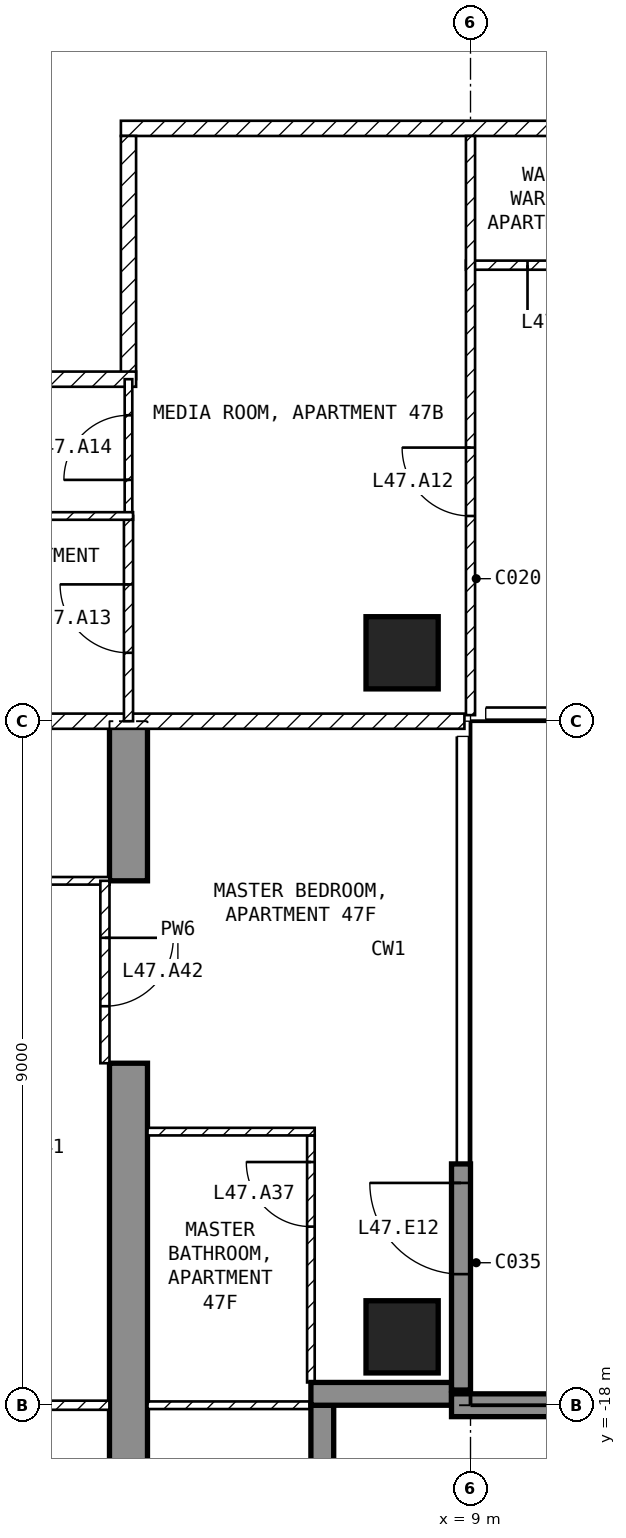
"""IFC4 building model, lengths in metres.
Left out: names, types, materials, properties, quantities, classifications, styles, units other than length and angle.
Written with IfcOpenShell. Run it as: python <this file> out.ifc"""

import sys

from ifc_helpers import new_model, si_unit, direction, frame, frame_2d, origin, origin_2d, place, context, subcontext, project, spatial, polyline, rectangle, outline, extrude, element, fill, save


model = new_model("IFC4")
c1 = context("Model", 3, precision=1e-05, world=origin(), true_north=direction((0.0, 1.0)))
c2 = subcontext(c1, "Body", "Model", "MODEL_VIEW")
j1 = project(units=[si_unit("LENGTHUNIT", "METRE"), si_unit("PLANEANGLEUNIT", "RADIAN")], contexts=[c1])
p1 = place(None, origin())
s1 = spatial("IfcSite", under=j1, at=p1, CompositionType="ELEMENT")
p2 = place(p1, origin())
s2 = spatial("IfcBuilding", under=s1, at=p2, CompositionType="ELEMENT")
p3 = place(p2, frame((0.0, 0.0, 191.1)))
s3 = spatial("IfcBuildingStorey", under=s2, at=p3, CompositionType="ELEMENT", Elevation=191.1)
for number, where, z_axis, x_axis in (
    (1, (8.1, -17.1, -0.25), (0.0, 0.0, 1.0), (1.0, 0.0, 0.0)),
    (2, (8.1, -8.1, -0.25), (0.0, 0.0, 1.0), (1.0, 0.0, 0.0)),
):
    element("IfcColumn", number, at=place(p3, frame(where, z_axis=z_axis, x_axis=x_axis)), inside=s3, PredefinedType="COLUMN", context=c2, shape_type="SweptSolid", body=[
        extrude(rectangle(XDim=0.95, YDim=0.95, at=origin_2d()), origin(), (0.0, 0.0, 1.0), 3.5),
    ])
p4 = place(p3, frame((4.25, -20.225, -0.25), z_axis=(1.0, 0.0, 0.0), x_axis=(0.0, 1.0, 0.0)))
e3 = element("IfcWall", 3, at=p4, inside=s3, PredefinedType="SHEAR", context=c2, shape_type="SweptSolid", body=[
    extrude(outline(polyline([(0.0, 0.0), (6.725, 0.0), (6.725, 2.65), (9.125, 2.65), (9.125, 0.0), (11.225, 0.0), (11.225, 3.5), (0.0, 3.5), (0.0, 0.0)])), origin(), (0.0, 0.0, 1.0), 0.5),
])
p5 = place(p3, frame((8.875, -17.8, 0.0), z_axis=(0.0, 0.0, 1.0), x_axis=(0.0, 1.0, 0.0)))
e4 = element("IfcWall", 4, at=p5, inside=s3, PredefinedType="SOLIDWALL", context=c2, shape_type="SweptSolid", body=[
    extrude(rectangle(XDim=2.975, YDim=0.25, at=frame_2d((1.488, 0.0))), origin(), (0.0, 0.0, 1.0), 3.25),
])
p6 = place(p5, frame((1.525, 0.0, 0.0)))
e5 = element("IfcOpeningElement", 5, at=p6, cuts=e4, PredefinedType="OPENING", context=c2, shape_type="SweptSolid", body=[
    extrude(rectangle(XDim=1.2, YDim=2.4, at=frame_2d((0.6, 1.2))), frame((0.0, 0.135, 0.0), z_axis=(0.0, -1.0, 0.0), x_axis=(1.0, 0.0, 0.0)), (0.0, 0.0, 1.0), 0.27),
])
p7 = place(p3, frame((7.05, -19.8, 0.0), z_axis=(0.0, 0.0, 1.0), x_axis=(0.0, 1.0, 0.0)))
e6 = element("IfcWall", 6, at=p7, inside=s3, PredefinedType="SOLIDWALL", context=c2, shape_type="SweptSolid", body=[
    extrude(rectangle(XDim=1.8, YDim=0.3, at=frame_2d((0.9, 0.0))), origin(), (0.0, 0.0, 1.0), 3.25),
])
p8 = place(p3, frame((6.9, -17.85, 0.0), z_axis=(0.0, 0.0, 1.0), x_axis=(1.0, 0.0, 0.0)))
e7 = element("IfcWall", 7, at=p8, inside=s3, PredefinedType="SOLIDWALL", context=c2, shape_type="SweptSolid", body=[
    extrude(rectangle(XDim=1.85, YDim=0.3, at=frame_2d((0.925, 0.0))), origin(), (0.0, 0.0, 1.0), 3.25),
])
p9 = place(p3, frame((8.75, -18.0, 0.0), z_axis=(0.0, 0.0, 1.0), x_axis=(1.0, 0.0, 0.0)))
e8 = element("IfcWall", 8, at=p9, inside=s3, PredefinedType="SOLIDWALL", context=c2, shape_type="SweptSolid", body=[
    extrude(rectangle(XDim=2.95, YDim=0.3, at=frame_2d((1.475, 0.0))), origin(), (0.0, 0.0, 1.0), 3.25),
])
p10 = place(p3, frame((21.6, -1.2, 0.0), z_axis=(0.0, 0.0, 1.0), x_axis=(-1.0, 0.0, 0.0)))
e9 = element("IfcWall", 9, at=p10, inside=s3, PredefinedType="PARTITIONING", context=c2, shape_type="SweptSolid", body=[
    extrude(rectangle(XDim=17.2, YDim=0.2, at=frame_2d((8.6, 0.0))), origin(), (0.0, 0.0, 1.0), 3.25),
])
p11 = place(p10, frame((6.1, 0.0, 0.0)))
e10 = element("IfcOpeningElement", 10, at=p11, cuts=e9, PredefinedType="OPENING", context=c2, shape_type="SweptSolid", body=[
    extrude(rectangle(XDim=1.0, YDim=2.1, at=frame_2d((0.5, 1.05))), frame((0.0, 0.11, 0.0), z_axis=(0.0, -1.0, 0.0), x_axis=(1.0, 0.0, 0.0)), (0.0, 0.0, 1.0), 0.22),
])
p12 = place(p3, frame((4.5, -1.3, 0.0), z_axis=(0.0, 0.0, 1.0), x_axis=(0.0, -1.0, 0.0)))
e11 = element("IfcWall", 11, at=p12, inside=s3, PredefinedType="PARTITIONING", context=c2, shape_type="SweptSolid", body=[
    extrude(rectangle(XDim=3.2, YDim=0.2, at=frame_2d((1.6, 0.0))), origin(), (0.0, 0.0, 1.0), 3.25),
])
p13 = place(p3, frame((4.6, -4.5, 0.0), z_axis=(0.0, 0.0, 1.0), x_axis=(-1.0, 0.0, 0.0)))
e12 = element("IfcWall", 12, at=p13, inside=s3, PredefinedType="PARTITIONING", context=c2, shape_type="SweptSolid", body=[
    extrude(rectangle(XDim=3.5, YDim=0.2, at=frame_2d((1.75, 0.0))), origin(), (0.0, 0.0, 1.0), 3.25),
])
p14 = place(p3, frame((8.92, -9.0, 0.0), z_axis=(0.0, 0.0, 1.0), x_axis=(-1.0, 0.0, 0.0)))
e13 = element("IfcWall", 13, at=p14, inside=s3, PredefinedType="PARTITIONING", context=c2, shape_type="SweptSolid", body=[
    extrude(rectangle(XDim=17.84, YDim=0.2, at=frame_2d((8.92, 0.0))), origin(), (0.0, 0.0, 1.0), 3.25),
])
p15 = place(p14, frame((8.42, 0.0, 0.0)))
e14 = element("IfcOpeningElement", 14, at=p15, cuts=e13, PredefinedType="OPENING", context=c2, shape_type="SweptSolid", body=[
    extrude(rectangle(XDim=1.0, YDim=2.1, at=frame_2d((0.5, 1.05))), frame((0.0, 0.11, 0.0), z_axis=(0.0, -1.0, 0.0), x_axis=(1.0, 0.0, 0.0)), (0.0, 0.0, 1.0), 0.22),
])
p16 = place(p3, frame((11.4, -3.0, 0.0), z_axis=(0.0, 0.0, 1.0), x_axis=(-1.0, 0.0, 0.0)))
e15 = element("IfcWall", 15, at=p16, inside=s3, PredefinedType="PARTITIONING", context=c2, shape_type="SweptSolid", body=[
    extrude(rectangle(XDim=2.46, YDim=0.12, at=frame_2d((1.23, 0.0))), origin(), (0.0, 0.0, 1.0), 3.25),
])
p17 = place(p16, frame((0.75, 0.0, 0.0)))
e16 = element("IfcOpeningElement", 16, at=p17, cuts=e15, PredefinedType="OPENING", context=c2, shape_type="SweptSolid", body=[
    extrude(rectangle(XDim=0.9, YDim=2.1, at=frame_2d((0.45, 1.05))), frame((0.0, 0.07, 0.0), z_axis=(0.0, -1.0, 0.0), x_axis=(1.0, 0.0, 0.0)), (0.0, 0.0, 1.0), 0.14),
])
p18 = place(p3, frame((9.0, -8.92, 0.0), z_axis=(0.0, 0.0, 1.0), x_axis=(0.0, 1.0, 0.0)))
e17 = element("IfcWall", 17, at=p18, inside=s3, PredefinedType="PARTITIONING", context=c2, shape_type="SweptSolid", body=[
    extrude(rectangle(XDim=7.62, YDim=0.12, at=frame_2d((3.81, 0.0))), origin(), (0.0, 0.0, 1.0), 3.25),
])
p19 = place(p18, frame((2.62, 0.0, 0.0)))
e18 = element("IfcOpeningElement", 18, at=p19, cuts=e17, PredefinedType="OPENING", context=c2, shape_type="SweptSolid", body=[
    extrude(rectangle(XDim=0.9, YDim=2.1, at=frame_2d((0.45, 1.05))), frame((0.0, 0.07, 0.0), z_axis=(0.0, -1.0, 0.0), x_axis=(1.0, 0.0, 0.0)), (0.0, 0.0, 1.0), 0.14),
])
p20 = place(p3, frame((4.5, -6.3, 0.0), z_axis=(0.0, 0.0, 1.0), x_axis=(0.0, 1.0, 0.0)))
e19 = element("IfcWall", 19, at=p20, inside=s3, PredefinedType="PARTITIONING", context=c2, shape_type="SweptSolid", body=[
    extrude(rectangle(XDim=1.8, YDim=0.1, at=frame_2d((0.9, 0.0))), origin(), (0.0, 0.0, 1.0), 3.25),
])
p21 = place(p20, frame((0.475, 0.0, 0.0)))
e20 = element("IfcOpeningElement", 20, at=p21, cuts=e19, PredefinedType="OPENING", context=c2, shape_type="SweptSolid", body=[
    extrude(rectangle(XDim=0.85, YDim=2.1, at=frame_2d((0.425, 1.05))), frame((0.0, 0.06, 0.0), z_axis=(0.0, -1.0, 0.0), x_axis=(1.0, 0.0, 0.0)), (0.0, 0.0, 1.0), 0.12),
])
p22 = place(p3, frame((4.5, -9.0, 0.0), z_axis=(0.0, 0.0, 1.0), x_axis=(0.0, 1.0, 0.0)))
e21 = element("IfcWall", 21, at=p22, inside=s3, PredefinedType="PARTITIONING", context=c2, shape_type="SweptSolid", body=[
    extrude(rectangle(XDim=2.7, YDim=0.12, at=frame_2d((1.35, 0.0))), origin(), (0.0, 0.0, 1.0), 3.25),
])
p23 = place(p22, frame((0.9, 0.0, 0.0)))
e22 = element("IfcOpeningElement", 22, at=p23, cuts=e21, PredefinedType="OPENING", context=c2, shape_type="SweptSolid", body=[
    extrude(rectangle(XDim=0.9, YDim=2.1, at=frame_2d((0.45, 1.05))), frame((0.0, 0.07, 0.0), z_axis=(0.0, -1.0, 0.0), x_axis=(1.0, 0.0, 0.0)), (0.0, 0.0, 1.0), 0.14),
])
p24 = place(p3, frame((4.56, -6.3, 0.0), z_axis=(0.0, 0.0, 1.0), x_axis=(-1.0, 0.0, 0.0)))
e23 = element("IfcWall", 23, at=p24, inside=s3, PredefinedType="PARTITIONING", context=c2, shape_type="SweptSolid", body=[
    extrude(rectangle(XDim=3.46, YDim=0.1, at=frame_2d((1.73, 0.0))), origin(), (0.0, 0.0, 1.0), 3.25),
])
p25 = place(p3, frame((4.25, -11.1, 0.0), z_axis=(0.0, 0.0, 1.0), x_axis=(-1.0, 0.0, 0.0)))
e24 = element("IfcWall", 24, at=p25, inside=s3, PredefinedType="PARTITIONING", context=c2, shape_type="SweptSolid", body=[
    extrude(rectangle(XDim=2.15, YDim=0.1, at=frame_2d((1.075, 0.0))), origin(), (0.0, 0.0, 1.0), 3.25),
])
p26 = place(p3, frame((4.25, -18.0, 0.0), z_axis=(0.0, 0.0, 1.0), x_axis=(-1.0, 0.0, 0.0)))
e25 = element("IfcWall", 25, at=p26, inside=s3, PredefinedType="PARTITIONING", context=c2, shape_type="SweptSolid", body=[
    extrude(rectangle(XDim=8.5, YDim=0.12, at=frame_2d((4.25, 0.0))), origin(), (0.0, 0.0, 1.0), 3.25),
])
p27 = place(p26, frame((1.925, 0.0, 0.0)))
e26 = element("IfcOpeningElement", 26, at=p27, cuts=e25, PredefinedType="OPENING", context=c2, shape_type="SweptSolid", body=[
    extrude(rectangle(XDim=0.9, YDim=2.1, at=frame_2d((0.45, 1.05))), frame((0.0, 0.07, 0.0), z_axis=(0.0, -1.0, 0.0), x_axis=(1.0, 0.0, 0.0)), (0.0, 0.0, 1.0), 0.14),
])
p28 = place(p3, frame((6.9, -17.7, 0.0), z_axis=(0.0, 0.0, 1.0), x_axis=(0.0, 1.0, 0.0)))
e27 = element("IfcWall", 27, at=p28, inside=s3, PredefinedType="PARTITIONING", context=c2, shape_type="SweptSolid", body=[
    extrude(rectangle(XDim=3.25, YDim=0.1, at=frame_2d((1.625, 0.0))), origin(), (0.0, 0.0, 1.0), 3.25),
])
p29 = place(p28, frame((2.05, 0.0, 0.0)))
e28 = element("IfcOpeningElement", 28, at=p29, cuts=e27, PredefinedType="OPENING", context=c2, shape_type="SweptSolid", body=[
    extrude(rectangle(XDim=0.85, YDim=2.1, at=frame_2d((0.425, 1.05))), frame((0.0, 0.06, 0.0), z_axis=(0.0, -1.0, 0.0), x_axis=(1.0, 0.0, 0.0)), (0.0, 0.0, 1.0), 0.12),
])
p30 = place(p3, frame((6.95, -14.4, 0.0), z_axis=(0.0, 0.0, 1.0), x_axis=(-1.0, 0.0, 0.0)))
e29 = element("IfcWall", 29, at=p30, inside=s3, PredefinedType="PARTITIONING", context=c2, shape_type="SweptSolid", body=[
    extrude(rectangle(XDim=2.2, YDim=0.1, at=frame_2d((1.1, 0.0))), origin(), (0.0, 0.0, 1.0), 3.25),
])
p31 = place(p3, frame((7.12, -18.0, 0.0), z_axis=(0.0, 0.0, 1.0), x_axis=(-1.0, 0.0, 0.0)))
e30 = element("IfcWall", 30, at=p31, inside=s3, PredefinedType="PARTITIONING", context=c2, shape_type="SweptSolid", body=[
    extrude(rectangle(XDim=2.37, YDim=0.1, at=frame_2d((1.185, 0.0))), origin(), (0.0, 0.0, 1.0), 3.25),
])
p32 = place(p3, frame((4.19, -11.1, 0.0), z_axis=(0.0, 0.0, 1.0), x_axis=(0.0, -1.0, 0.0)))
e31 = element("IfcWall", 31, at=p32, inside=s3, PredefinedType="PARTITIONING", context=c2, shape_type="SweptSolid", body=[
    extrude(rectangle(XDim=2.4, YDim=0.12, at=frame_2d((1.2, 0.0))), origin(), (0.0, 0.0, 1.0), 2.4),
])
p33 = place(p32, frame((0.75, 0.0, 0.0)))
e32 = element("IfcOpeningElement", 32, at=p33, cuts=e31, PredefinedType="OPENING", context=c2, shape_type="SweptSolid", body=[
    extrude(rectangle(XDim=0.9, YDim=2.1, at=frame_2d((0.45, 1.05))), frame((0.0, 0.07, 0.0), z_axis=(0.0, -1.0, 0.0), x_axis=(1.0, 0.0, 0.0)), (0.0, 0.0, 1.0), 0.14),
])
p34 = place(p6, origin())
e33 = element("IfcDoor", 33, at=p34, inside=s3, OperationType="SINGLE_SWING_RIGHT", PredefinedType="DOOR", context=c2, shape_type="SweptSolid", body=[
    extrude(rectangle(XDim=1.2, YDim=2.4, at=frame_2d((0.6, 1.2))), frame((0.0, 0.025, 0.0), z_axis=(0.0, -1.0, 0.0), x_axis=(1.0, 0.0, 0.0)), (0.0, 0.0, 1.0), 0.05),
])
fill(e5, e33)
p35 = place(p19, origin())
e34 = element("IfcDoor", 34, at=p35, inside=s3, OperationType="SINGLE_SWING_RIGHT", PredefinedType="DOOR", context=c2, shape_type="SweptSolid", body=[
    extrude(rectangle(XDim=0.9, YDim=2.1, at=frame_2d((0.45, 1.05))), frame((0.0, 0.025, 0.0), z_axis=(0.0, -1.0, 0.0), x_axis=(1.0, 0.0, 0.0)), (0.0, 0.0, 1.0), 0.05),
])
fill(e18, e34)
p36 = place(p23, origin())
e35 = element("IfcDoor", 35, at=p36, inside=s3, OperationType="SINGLE_SWING_RIGHT", PredefinedType="DOOR", context=c2, shape_type="SweptSolid", body=[
    extrude(rectangle(XDim=0.9, YDim=2.1, at=frame_2d((0.45, 1.05))), frame((0.0, 0.025, 0.0), z_axis=(0.0, -1.0, 0.0), x_axis=(1.0, 0.0, 0.0)), (0.0, 0.0, 1.0), 0.05),
])
fill(e22, e35)
p37 = place(p21, origin())
e36 = element("IfcDoor", 36, at=p37, inside=s3, OperationType="SINGLE_SWING_LEFT", PredefinedType="DOOR", context=c2, shape_type="SweptSolid", body=[
    extrude(rectangle(XDim=0.85, YDim=2.1, at=frame_2d((0.425, 1.05))), frame((0.0, 0.025, 0.0), z_axis=(0.0, -1.0, 0.0), x_axis=(1.0, 0.0, 0.0)), (0.0, 0.0, 1.0), 0.05),
])
fill(e20, e36)
p38 = place(p17, origin())
e37 = element("IfcDoor", 37, at=p38, inside=s3, OperationType="SINGLE_SWING_RIGHT", PredefinedType="DOOR", context=c2, shape_type="SweptSolid", body=[
    extrude(rectangle(XDim=0.9, YDim=2.1, at=frame_2d((0.45, 1.05))), frame((0.0, 0.025, 0.0), z_axis=(0.0, -1.0, 0.0), x_axis=(1.0, 0.0, 0.0)), (0.0, 0.0, 1.0), 0.05),
])
fill(e16, e37)
p39 = place(p29, origin())
e38 = element("IfcDoor", 38, at=p39, inside=s3, OperationType="SINGLE_SWING_RIGHT", PredefinedType="DOOR", context=c2, shape_type="SweptSolid", body=[
    extrude(rectangle(XDim=0.85, YDim=2.1, at=frame_2d((0.425, 1.05))), frame((0.0, 0.025, 0.0), z_axis=(0.0, -1.0, 0.0), x_axis=(1.0, 0.0, 0.0)), (0.0, 0.0, 1.0), 0.05),
])
fill(e28, e38)
p40 = place(p33, origin())
e39 = element("IfcDoor", 39, at=p40, inside=s3, OperationType="SINGLE_SWING_LEFT", PredefinedType="DOOR", context=c2, shape_type="SweptSolid", body=[
    extrude(rectangle(XDim=0.9, YDim=2.1, at=frame_2d((0.45, 1.05))), frame((0.0, 0.025, 0.0), z_axis=(0.0, -1.0, 0.0), x_axis=(1.0, 0.0, 0.0)), (0.0, 0.0, 1.0), 0.05),
])
fill(e32, e39)
save(model, sys.argv[1])
